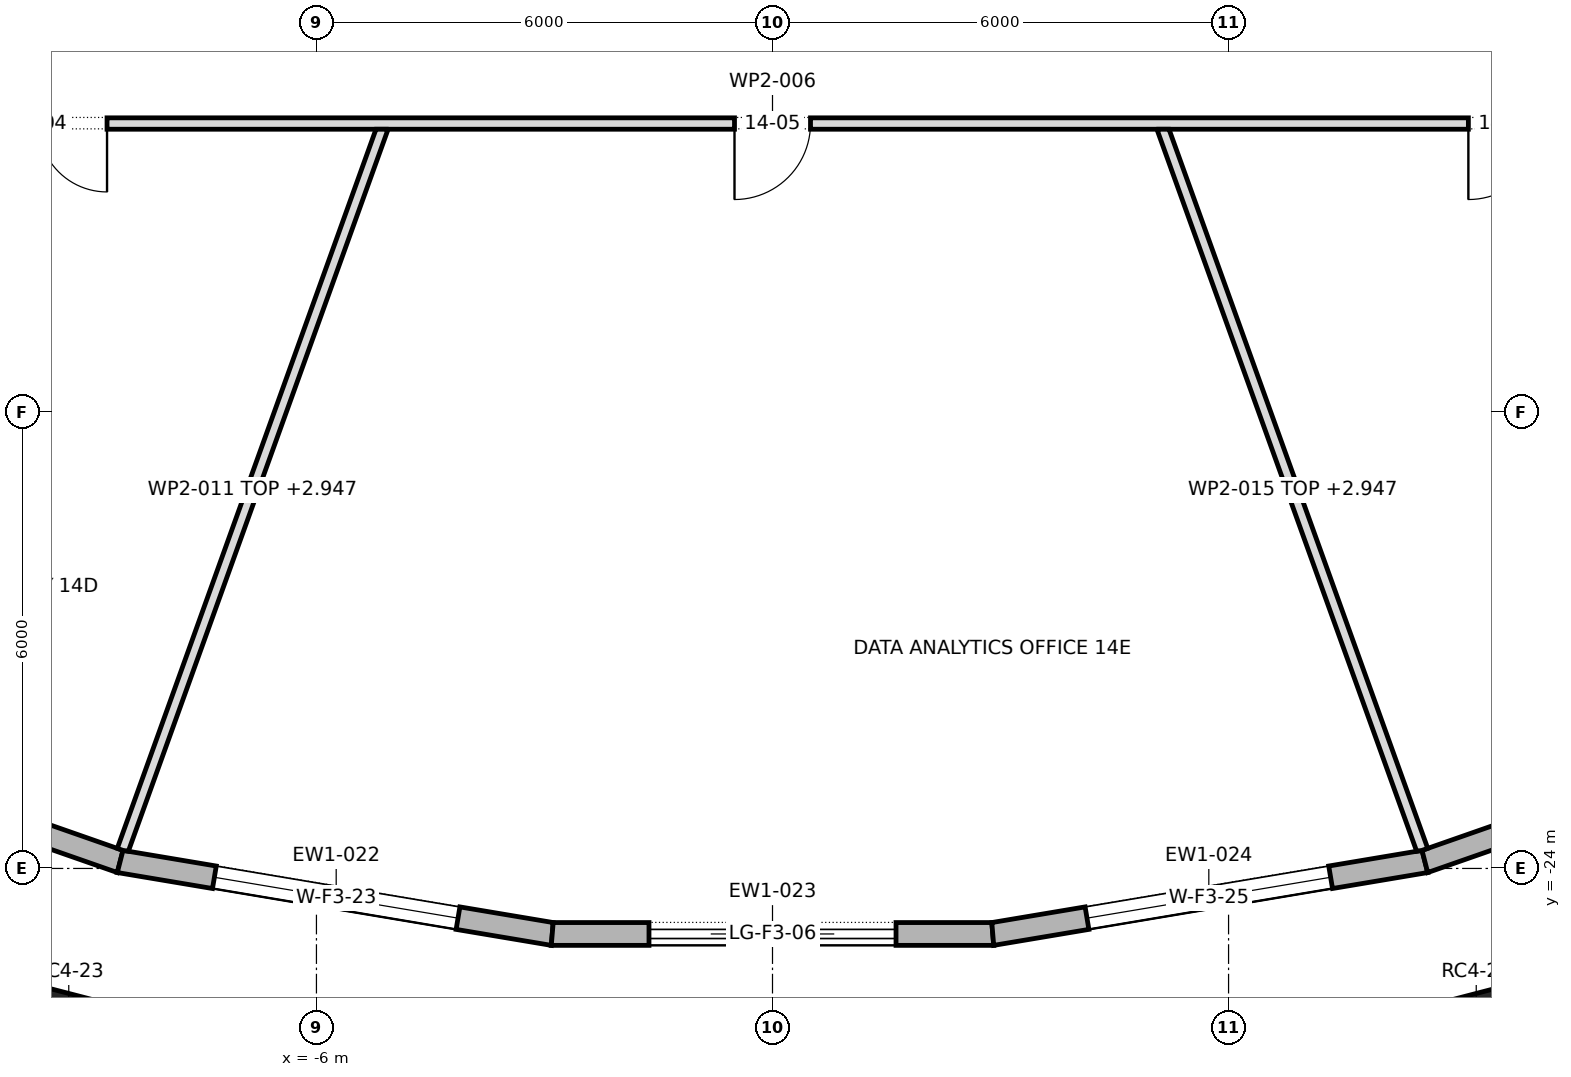
"""IFC4 building model, lengths in metres.
Left out: names, types, materials, properties, quantities, classifications, styles, units other than length and angle.
Written with IfcOpenShell. Run it as: python <this file> out.ifc"""

import sys

from ifc_helpers import new_model, si_unit, direction, frame, frame_2d, origin, origin_2d, place, context, subcontext, project, spatial, polyline, rectangle, outline, extrude, element, fill, save


model = new_model("IFC4")
c1 = context("Model", 3, precision=1e-05, world=origin(), true_north=direction((0.0, 1.0)))
c2 = subcontext(c1, "Body", "Model", "MODEL_VIEW")
j1 = project(units=[si_unit("LENGTHUNIT", "METRE"), si_unit("PLANEANGLEUNIT", "RADIAN")], contexts=[c1])
p1 = place(None, origin())
s1 = spatial("IfcSite", under=j1, at=p1, CompositionType="ELEMENT")
p2 = place(p1, origin())
s2 = spatial("IfcBuilding", under=s1, at=p2, CompositionType="ELEMENT")
p3 = place(p2, frame((0.0, 0.0, 210.9)))
s3 = spatial("IfcBuildingStorey", under=s2, at=p3, CompositionType="ELEMENT", Elevation=210.9)
for number, where, z_axis, x_axis in (
    (1, (-9.259, -26.161, 0.0), (0.0, 0.0, 1.0), (0.968, -0.252, 0.0)),
    (2, (9.259, -26.161, 0.0), (0.0, 0.0, 1.0), (0.968, 0.252, 0.0)),
):
    element("IfcColumn", number, at=place(p3, frame(where, z_axis=z_axis, x_axis=x_axis)), inside=s3, PredefinedType="COLUMN", context=c2, shape_type="SweptSolid", body=[
        extrude(rectangle(XDim=1.2, YDim=1.0, at=origin_2d()), origin(), (0.0, 0.0, 1.0), 4.0),
    ])
p4 = place(p3, frame((-13.938, -22.037, 0.0), z_axis=(0.0, 0.0, 1.0), x_axis=(0.944023272224, -0.329878858824, 0.0)))
e3 = element("IfcWall", 3, at=p4, inside=s3, PredefinedType="STANDARD", context=c2, shape_type="SweptSolid", body=[
    extrude(outline(polyline([(-0.013, -0.15), (5.686, -0.15), (5.661, 0.15), (0.013, 0.15), (-0.013, -0.15)])), origin(), (0.0, 0.0, 1.0), 3.7),
])
p5 = place(p4, frame((1.212, 0.0, 0.6)))
e4 = element("IfcOpeningElement", 4, at=p5, cuts=e3, PredefinedType="OPENING", context=c2, shape_type="SweptSolid", body=[
    extrude(rectangle(XDim=3.25, YDim=2.65, at=frame_2d((1.625, 1.325))), frame((0.0, 0.162, 0.0), z_axis=(0.0, -1.0, 0.0), x_axis=(1.0, 0.0, 0.0)), (0.0, 0.0, 1.0), 0.324),
])
p6 = place(p3, frame((-8.583, -23.908, 0.0), z_axis=(0.0, 0.0, 1.0), x_axis=(0.98622052717, -0.165436005116, 0.0)))
e5 = element("IfcWall", 5, at=p6, inside=s3, PredefinedType="STANDARD", context=c2, shape_type="SweptSolid", body=[
    extrude(outline(polyline([(-0.013, -0.15), (5.777, -0.15), (5.752, 0.15), (0.013, 0.15), (-0.013, -0.15)])), origin(), (0.0, 0.0, 1.0), 3.7),
])
p7 = place(p6, frame((1.257, 0.0, 0.6)))
e6 = element("IfcOpeningElement", 6, at=p7, cuts=e5, PredefinedType="OPENING", context=c2, shape_type="SweptSolid", body=[
    extrude(rectangle(XDim=3.25, YDim=2.65, at=frame_2d((1.625, 1.325))), frame((0.0, 0.162, 0.0), z_axis=(0.0, -1.0, 0.0), x_axis=(1.0, 0.0, 0.0)), (0.0, 0.0, 1.0), 0.324),
])
p8 = place(p3, frame((-2.898, -24.862, 0.0), z_axis=(0.0, 0.0, 1.0), x_axis=(1.0, 0.0, 0.0)))
e7 = element("IfcWall", 7, at=p8, inside=s3, PredefinedType="STANDARD", context=c2, shape_type="SweptSolid", body=[
    extrude(outline(polyline([(-0.012, -0.15), (5.808, -0.15), (5.783, 0.15), (0.012, 0.15), (-0.012, -0.15)])), origin(), (0.0, 0.0, 1.0), 3.7),
])
p9 = place(p8, frame((1.273, 0.0, 0.0)))
e8 = element("IfcOpeningElement", 8, at=p9, cuts=e7, PredefinedType="OPENING", context=c2, shape_type="SweptSolid", body=[
    extrude(rectangle(XDim=3.25, YDim=3.25, at=frame_2d((1.625, 1.625))), frame((0.0, 0.162, 0.0), z_axis=(0.0, -1.0, 0.0), x_axis=(1.0, 0.0, 0.0)), (0.0, 0.0, 1.0), 0.324),
])
p10 = place(p3, frame((2.898, -24.862, 0.0), z_axis=(0.0, 0.0, 1.0), x_axis=(0.98622052717, 0.165436005116, 0.0)))
e9 = element("IfcWall", 9, at=p10, inside=s3, PredefinedType="STANDARD", context=c2, shape_type="SweptSolid", body=[
    extrude(outline(polyline([(-0.012, -0.15), (5.777, -0.15), (5.751, 0.15), (0.012, 0.15), (-0.012, -0.15)])), origin(), (0.0, 0.0, 1.0), 3.7),
])
p11 = place(p10, frame((1.257, 0.0, 0.6)))
e10 = element("IfcOpeningElement", 10, at=p11, cuts=e9, PredefinedType="OPENING", context=c2, shape_type="SweptSolid", body=[
    extrude(rectangle(XDim=3.25, YDim=2.65, at=frame_2d((1.625, 1.325))), frame((0.0, 0.162, 0.0), z_axis=(0.0, -1.0, 0.0), x_axis=(1.0, 0.0, 0.0)), (0.0, 0.0, 1.0), 0.324),
])
p12 = place(p3, frame((8.583, -23.908, 0.0), z_axis=(0.0, 0.0, 1.0), x_axis=(0.944023272224, 0.329878858824, 0.0)))
e11 = element("IfcWall", 11, at=p12, inside=s3, PredefinedType="STANDARD", context=c2, shape_type="SweptSolid", body=[
    extrude(outline(polyline([(-0.013, -0.15), (5.687, -0.15), (5.66, 0.15), (0.013, 0.15), (-0.013, -0.15)])), origin(), (0.0, 0.0, 1.0), 3.7),
])
p13 = place(p12, frame((1.212, 0.0, 0.6)))
e12 = element("IfcOpeningElement", 12, at=p13, cuts=e11, PredefinedType="OPENING", context=c2, shape_type="SweptSolid", body=[
    extrude(rectangle(XDim=3.25, YDim=2.65, at=frame_2d((1.625, 1.325))), frame((0.0, 0.162, 0.0), z_axis=(0.0, -1.0, 0.0), x_axis=(1.0, 0.0, 0.0)), (0.0, 0.0, 1.0), 0.324),
])
p14 = place(p3, frame((-14.275, -14.2, 0.0), z_axis=(0.0, 0.0, 1.0), x_axis=(1.0, 0.0, 0.0)))
e13 = element("IfcWall", 13, at=p14, inside=s3, PredefinedType="PARTITIONING", context=c2, shape_type="SweptSolid", body=[
    extrude(outline(polyline([(28.55, -0.075), (28.55, -0.075), (28.4, 0.075), (26.517, 0.075), (24.633, 0.075), (22.75, 0.075), (20.866, 0.075), (18.983, 0.075), (17.1, 0.075), (15.217, 0.075), (13.333, 0.075), (11.45, 0.075), (9.567, 0.075), (7.683, 0.075), (5.8, 0.075), (3.917, 0.075), (2.033, 0.075), (0.15, 0.075), (0.0, -0.075), (1.903, -0.075), (3.807, -0.075), (5.71, -0.075), (7.613, -0.075), (9.517, -0.075), (11.42, -0.075), (13.323, -0.075), (15.227, -0.075), (17.13, -0.075), (19.033, -0.075), (20.937, -0.075), (22.84, -0.075), (24.743, -0.075), (26.646, -0.075), (28.55, -0.075)])), origin(), (0.0, 0.0, 1.0), 3.7),
])
p15 = place(p14, frame((3.72, 0.0, 0.0)))
e14 = element("IfcOpeningElement", 14, at=p15, cuts=e13, PredefinedType="OPENING", context=c2, shape_type="SweptSolid", body=[
    extrude(rectangle(XDim=1.8, YDim=2.1, at=frame_2d((0.9, 1.05))), frame((0.0, 0.087, 0.0), z_axis=(0.0, -1.0, 0.0), x_axis=(1.0, 0.0, 0.0)), (0.0, 0.0, 1.0), 0.174),
])
p16 = place(p14, frame((13.775, 0.0, 0.0)))
e15 = element("IfcOpeningElement", 15, at=p16, cuts=e13, PredefinedType="OPENING", context=c2, shape_type="SweptSolid", body=[
    extrude(rectangle(XDim=1.0, YDim=2.1, at=frame_2d((0.5, 1.05))), frame((0.0, 0.087, 0.0), z_axis=(0.0, -1.0, 0.0), x_axis=(1.0, 0.0, 0.0)), (0.0, 0.0, 1.0), 0.174),
])
p17 = place(p14, frame((23.43, 0.0, 0.0)))
e16 = element("IfcOpeningElement", 16, at=p17, cuts=e13, PredefinedType="OPENING", context=c2, shape_type="SweptSolid", body=[
    extrude(rectangle(XDim=1.0, YDim=2.1, at=frame_2d((0.5, 1.05))), frame((0.0, 0.087, 0.0), z_axis=(0.0, -1.0, 0.0), x_axis=(1.0, 0.0, 0.0)), (0.0, 0.0, 1.0), 0.174),
])
p18 = place(p3, frame((-5.128, -14.25, 0.0), z_axis=(0.0, 0.0, 1.0), x_axis=(-0.338529589418, -0.940955746615, 0.0)))
e17 = element("IfcWall", 17, at=p18, inside=s3, PredefinedType="PARTITIONING", context=c2, shape_type="SweptSolid", body=[
    extrude(outline(polyline([(10.108, -0.075), (10.108, -0.072), (10.107, 0.005), (10.095, 0.075), (8.412, 0.075), (6.73, 0.075), (5.047, 0.075), (3.365, 0.075), (1.682, 0.075), (0.0, 0.075), (0.0, 0.074), (0.053, -0.075), (1.729, -0.075), (3.405, -0.075), (5.081, -0.075), (6.757, -0.075), (8.432, -0.075), (10.108, -0.075)])), origin(), (0.0, 0.0, 1.0), 2.947),
])
p19 = place(p3, frame((5.128, -14.25, 0.0), z_axis=(0.0, 0.0, 1.0), x_axis=(0.338529589418, -0.940955746615, 0.0)))
e18 = element("IfcWall", 18, at=p19, inside=s3, PredefinedType="PARTITIONING", context=c2, shape_type="SweptSolid", body=[
    extrude(outline(polyline([(0.0, -0.075), (1.682, -0.075), (3.365, -0.075), (5.047, -0.075), (6.73, -0.075), (8.412, -0.075), (10.095, -0.075), (10.107, -0.005), (10.108, 0.072), (10.108, 0.075), (8.432, 0.075), (6.757, 0.075), (5.081, 0.075), (3.405, 0.075), (1.729, 0.075), (0.053, 0.075), (0.0, -0.074), (0.0, -0.075)])), origin(), (0.0, 0.0, 1.0), 2.947),
])
p20 = place(p7, origin())
e19 = element("IfcWindow", 19, at=p20, inside=s3, PartitioningType="TRIPLE_PANEL_VERTICAL", PredefinedType="WINDOW", context=c2, shape_type="SweptSolid", body=[
    extrude(rectangle(XDim=3.25, YDim=2.65, at=frame_2d((1.625, 1.325))), frame((0.0, 0.03, 0.0), z_axis=(0.0, -1.0, 0.0), x_axis=(1.0, 0.0, 0.0)), (0.0, 0.0, 1.0), 0.06),
])
fill(e6, e19)
p21 = place(p9, origin())
e20 = element("IfcDoor", 20, at=p21, inside=s3, OperationType="DOUBLE_DOOR_SLIDING", PredefinedType="DOOR", context=c2, shape_type="SweptSolid", body=[
    extrude(rectangle(XDim=3.25, YDim=3.25, at=frame_2d((1.625, 1.625))), frame((0.0, 0.025, 0.0), z_axis=(0.0, -1.0, 0.0), x_axis=(1.0, 0.0, 0.0)), (0.0, 0.0, 1.0), 0.05),
])
fill(e8, e20)
p22 = place(p11, origin())
e21 = element("IfcWindow", 21, at=p22, inside=s3, PartitioningType="TRIPLE_PANEL_VERTICAL", PredefinedType="WINDOW", context=c2, shape_type="SweptSolid", body=[
    extrude(rectangle(XDim=3.25, YDim=2.65, at=frame_2d((1.625, 1.325))), frame((0.0, 0.03, 0.0), z_axis=(0.0, -1.0, 0.0), x_axis=(1.0, 0.0, 0.0)), (0.0, 0.0, 1.0), 0.06),
])
fill(e10, e21)
p23 = place(p15, frame((1.8, 0.0, 0.0), z_axis=(0.0, 0.0, 1.0), x_axis=(-1.0, 0.0, 0.0)))
e22 = element("IfcDoor", 22, at=p23, inside=s3, OperationType="DOUBLE_DOOR_SINGLE_SWING", PredefinedType="DOOR", context=c2, shape_type="SweptSolid", body=[
    extrude(rectangle(XDim=1.8, YDim=2.1, at=frame_2d((0.9, 1.05))), frame((0.0, 0.025, 0.0), z_axis=(0.0, -1.0, 0.0), x_axis=(1.0, 0.0, 0.0)), (0.0, 0.0, 1.0), 0.05),
])
fill(e14, e22)
p24 = place(p16, frame((1.0, 0.0, 0.0), z_axis=(0.0, 0.0, 1.0), x_axis=(-1.0, 0.0, 0.0)))
e23 = element("IfcDoor", 23, at=p24, inside=s3, OperationType="SINGLE_SWING_LEFT", PredefinedType="DOOR", context=c2, shape_type="SweptSolid", body=[
    extrude(rectangle(XDim=1.0, YDim=2.1, at=frame_2d((0.5, 1.05))), frame((0.0, 0.025, 0.0), z_axis=(0.0, -1.0, 0.0), x_axis=(1.0, 0.0, 0.0)), (0.0, 0.0, 1.0), 0.05),
])
fill(e15, e23)
p25 = place(p17, frame((1.0, 0.0, 0.0), z_axis=(0.0, 0.0, 1.0), x_axis=(-1.0, 0.0, 0.0)))
e24 = element("IfcDoor", 24, at=p25, inside=s3, OperationType="SINGLE_SWING_LEFT", PredefinedType="DOOR", context=c2, shape_type="SweptSolid", body=[
    extrude(rectangle(XDim=1.0, YDim=2.1, at=frame_2d((0.5, 1.05))), frame((0.0, 0.025, 0.0), z_axis=(0.0, -1.0, 0.0), x_axis=(1.0, 0.0, 0.0)), (0.0, 0.0, 1.0), 0.05),
])
fill(e16, e24)
save(model, sys.argv[1])
